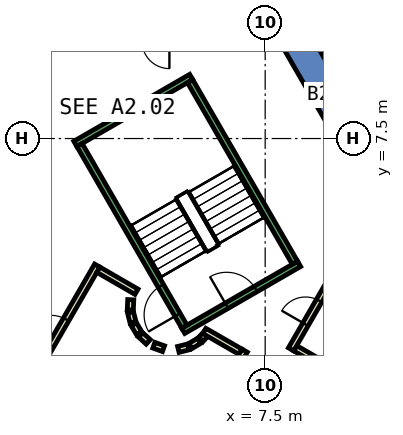
"""IFC4 building model, lengths in metres.
Left out: names, types, materials, properties, quantities, classifications, styles, units other than length and angle.
Written with IfcOpenShell. Run it as: python <this file> out.ifc"""

import sys

from ifc_helpers import new_model, si_unit, direction, frame, frame_2d, origin, place, context, subcontext, project, spatial, polyline, rectangle, outline, extrude, element, fill, save


model = new_model("IFC4")
c1 = context("Model", 3, precision=1e-05, world=origin(), true_north=direction((0.0, 1.0)))
c2 = subcontext(c1, "Body", "Model", "MODEL_VIEW")
j1 = project(units=[si_unit("LENGTHUNIT", "METRE"), si_unit("PLANEANGLEUNIT", "RADIAN")], contexts=[c1])
p1 = place(None, origin())
s1 = spatial("IfcSite", under=j1, at=p1, CompositionType="ELEMENT")
p2 = place(p1, origin())
s2 = spatial("IfcBuilding", under=s1, at=p2, CompositionType="ELEMENT")
p3 = place(p2, frame((0.0, 0.0, -11.0)))
s3 = spatial("IfcBuildingStorey", under=s2, at=p3, CompositionType="ELEMENT", Elevation=-11.0)
p4 = place(p3, frame((0.0, 0.0, -0.42)))
e1 = element("IfcWall", 1, at=p4, inside=s3, PredefinedType="SHEAR", context=c2, shape_type="SweptSolid", body=[
    extrude(outline(polyline([(8.517, 11.748), (7.651, 11.248), (12.702, 2.5), (13.856, 2.5), (8.517, 11.748)])), origin(), (0.0, 0.0, 1.0), 5.5),
])
p5 = place(p3, frame((0.0, 0.0, -0.42)))
e2 = element("IfcWall", 2, at=p5, inside=s3, PredefinedType="SHEAR", context=c2, shape_type="SweptSolid", body=[
    extrude(outline(polyline([(6.928, -9.5), (13.856, 2.5), (12.702, 2.5), (6.351, -8.5), (6.928, -9.5)])), origin(), (0.0, 0.0, 1.0), 5.5),
])
p6 = place(p3, frame((10.653, -0.648, 0.0), z_axis=(0.0, 0.0, 1.0), x_axis=(-0.866022959057, 0.500004234368, 0.0)))
e3 = element("IfcWall", 3, at=p6, inside=s3, PredefinedType="PARTITIONING", context=c2, shape_type="SweptSolid", body=[
    extrude(rectangle(XDim=2.5, YDim=0.2, at=frame_2d((1.25, 0.0))), origin(), (0.0, 0.0, 1.0), 5.05),
])
p7 = place(p3, frame((8.351, 0.565, 0.0), z_axis=(0.0, 0.0, 1.0), x_axis=(0.49989585183, 0.866085525409, 0.0)))
e4 = element("IfcWall", 4, at=p7, inside=s3, PredefinedType="PARTITIONING", context=c2, shape_type="SweptSolid", body=[
    extrude(rectangle(XDim=2.6, YDim=0.2, at=frame_2d((1.3, 0.0))), origin(), (0.0, 0.0, 1.0), 5.05),
])
p8 = place(p7, frame((0.95, 0.0, 0.0)))
e5 = element("IfcOpeningElement", 5, at=p8, cuts=e4, PredefinedType="OPENING", context=c2, shape_type="SweptSolid", body=[
    extrude(rectangle(XDim=0.9, YDim=2.1, at=frame_2d((0.45, 1.05))), frame((0.0, 0.11, 0.0), z_axis=(0.0, -1.0, 0.0), x_axis=(1.0, 0.0, 0.0)), (0.0, 0.0, 1.0), 0.22),
])
p9 = place(p3, frame((3.079, 2.199, 0.0), z_axis=(0.0, 0.0, 1.0), x_axis=(-0.047771483479, -0.998858290933, 0.0)))
e6 = element("IfcWall", 6, at=p9, inside=s3, PredefinedType="PARTITIONING", context=c2, shape_type="SweptSolid", body=[
    extrude(rectangle(XDim=0.337, YDim=0.2, at=frame_2d((0.169, 0.0))), origin(), (0.0, 0.0, 1.0), 5.05),
])
p10 = place(p3, frame((3.07, 1.786, 0.0), z_axis=(0.0, 0.0, 1.0), x_axis=(0.242705583207, -0.970099994784, 0.0)))
e7 = element("IfcWall", 7, at=p10, inside=s3, PredefinedType="PARTITIONING", context=c2, shape_type="SweptSolid", body=[
    extrude(rectangle(XDim=0.338, YDim=0.2, at=frame_2d((0.169, 0.0))), origin(), (0.0, 0.0, 1.0), 5.05),
])
for number, where, z_axis, x_axis in (
    (8, (3.182, 1.388, 0.0), (0.0, 0.0, 1.0), (0.512, -0.859, 0.0)),
    (9, (3.404, 1.039, 0.0), (0.0, 0.0, 1.0), (0.74, -0.672, 0.0)),
):
    element("IfcWall", number, at=place(p3, frame(where, z_axis=z_axis, x_axis=x_axis)), inside=s3, PredefinedType="PARTITIONING", context=c2, shape_type="SweptSolid", body=[
        extrude(rectangle(XDim=0.338, YDim=0.2, at=frame_2d((0.169, 0.0))), origin(), (0.0, 0.0, 1.0), 5.05),
    ])
p11 = place(p3, frame((3.838, 0.702, 0.0), z_axis=(0.0, 0.0, 1.0), x_axis=(0.941035081519, -0.338308993895, 0.0)))
e10 = element("IfcWall", 10, at=p11, inside=s3, PredefinedType="PARTITIONING", context=c2, shape_type="SweptSolid", body=[
    extrude(rectangle(XDim=0.337, YDim=0.2, at=frame_2d((0.168, 0.0))), origin(), (0.0, 0.0, 1.0), 5.05),
])
p12 = place(p3, frame((4.644, 0.564, 0.0), z_axis=(0.0, 0.0, 1.0), x_axis=(0.969929076366, 0.243387729394, 0.0)))
e11 = element("IfcWall", 11, at=p12, inside=s3, PredefinedType="PARTITIONING", context=c2, shape_type="SweptSolid", body=[
    extrude(rectangle(XDim=0.337, YDim=0.2, at=frame_2d((0.168, 0.0))), origin(), (0.0, 0.0, 1.0), 5.05),
])
p13 = place(p3, frame((5.042, 0.676, 0.0), z_axis=(0.0, 0.0, 1.0), x_axis=(0.857940155512, 0.513749637042, 0.0)))
e12 = element("IfcWall", 12, at=p13, inside=s3, PredefinedType="PARTITIONING", context=c2, shape_type="SweptSolid", body=[
    extrude(rectangle(XDim=0.337, YDim=0.2, at=frame_2d((0.168, 0.0))), origin(), (0.0, 0.0, 1.0), 5.05),
])
p14 = place(p3, frame((5.39, 0.898, 0.0), z_axis=(0.0, 0.0, 1.0), x_axis=(0.673828488714, 0.738887791073, 0.0)))
e13 = element("IfcWall", 13, at=p14, inside=s3, PredefinedType="PARTITIONING", context=c2, shape_type="SweptSolid", body=[
    extrude(rectangle(XDim=0.263, YDim=0.2, at=frame_2d((0.131, 0.0))), origin(), (0.0, 0.0, 1.0), 5.05),
])
p15 = place(p3, frame((5.499, 1.172, 0.0), z_axis=(0.0, 0.0, 1.0), x_axis=(0.866333505267, -0.499465972466, 0.0)))
e14 = element("IfcWall", 14, at=p15, inside=s3, PredefinedType="PARTITIONING", context=c2, shape_type="SweptSolid", body=[
    extrude(rectangle(XDim=1.374, YDim=0.2, at=frame_2d((0.687, 0.0))), origin(), (0.0, 0.0, 1.0), 5.05),
])
p16 = place(p3, frame((6.826, 0.522, 0.0), z_axis=(0.0, 0.0, 1.0), x_axis=(-0.500016722714, -0.866015748706, 0.0)))
e15 = element("IfcWall", 15, at=p16, inside=s3, PredefinedType="PARTITIONING", context=c2, shape_type="SweptSolid", body=[
    extrude(rectangle(XDim=1.7, YDim=0.2, at=frame_2d((0.85, 0.0))), origin(), (0.0, 0.0, 1.0), 5.05),
])
p17 = place(p3, frame((-0.52, -1.0, 0.0), z_axis=(0.0, 0.0, 1.0), x_axis=(0.50011622646, 0.865958290007, 0.0)))
e16 = element("IfcWall", 16, at=p17, inside=s3, PredefinedType="PARTITIONING", context=c2, shape_type="SweptSolid", body=[
    extrude(rectangle(XDim=4.991, YDim=0.2, at=frame_2d((2.496, 0.0))), origin(), (0.0, 0.0, 1.0), 5.05),
])
p18 = place(p17, frame((1.945, 0.0, 0.0)))
e17 = element("IfcOpeningElement", 17, at=p18, cuts=e16, PredefinedType="OPENING", context=c2, shape_type="SweptSolid", body=[
    extrude(rectangle(XDim=1.0, YDim=2.1, at=frame_2d((0.5, 1.05))), frame((0.0, 0.11, 0.0), z_axis=(0.0, -1.0, 0.0), x_axis=(1.0, 0.0, 0.0)), (0.0, 0.0, 1.0), 0.22),
])
p19 = place(p3, frame((2.012, 3.186, 0.0), z_axis=(0.0, 0.0, 1.0), x_axis=(0.865891012941, -0.500232699559, 0.0)))
e18 = element("IfcWall", 18, at=p19, inside=s3, PredefinedType="PARTITIONING", context=c2, shape_type="SweptSolid", body=[
    extrude(rectangle(XDim=1.449, YDim=0.2, at=frame_2d((0.725, 0.0))), origin(), (0.0, 0.0, 1.0), 5.05),
])
p20 = place(p3, frame((4.806, 1.176, 0.0), z_axis=(0.0, 0.0, 1.0), x_axis=(0.866059941101, 0.499940174841, 0.0)))
e19 = element("IfcWall", 19, at=p20, inside=s3, PredefinedType="STANDARD", context=c2, shape_type="SweptSolid", body=[
    extrude(rectangle(XDim=4.4, YDim=0.2, at=frame_2d((2.2, 0.0))), origin(), (0.0, 0.0, 1.0), 5.05),
])
p21 = place(p20, frame((1.65, 0.0, 0.0)))
e20 = element("IfcOpeningElement", 20, at=p21, cuts=e19, PredefinedType="OPENING", context=c2, shape_type="SweptSolid", body=[
    extrude(rectangle(XDim=1.1, YDim=2.2, at=frame_2d((0.55, 1.1))), frame((0.0, 0.11, 0.0), z_axis=(0.0, -1.0, 0.0), x_axis=(1.0, 0.0, 0.0)), (0.0, 0.0, 1.0), 0.22),
])
p22 = place(p3, frame((1.256, 7.324, 0.0), z_axis=(0.0, 0.0, 1.0), x_axis=(0.866046073146, 0.499964197906, 0.0)))
e21 = element("IfcWall", 21, at=p22, inside=s3, PredefinedType="STANDARD", context=c2, shape_type="SweptSolid", body=[
    extrude(rectangle(XDim=4.4, YDim=0.2, at=frame_2d((2.2, 0.0))), origin(), (0.0, 0.0, 1.0), 5.05),
])
p23 = place(p3, frame((4.843, 1.312, 0.0), z_axis=(0.0, 0.0, 1.0), x_axis=(-0.499963383562, 0.866046543262, 0.0)))
e22 = element("IfcWall", 22, at=p23, inside=s3, PredefinedType="STANDARD", context=c2, shape_type="SweptSolid", body=[
    extrude(rectangle(XDim=6.9, YDim=0.2, at=frame_2d((3.45, 0.0))), origin(), (0.0, 0.0, 1.0), 5.05),
])
p24 = place(p23, frame((0.45, 0.0, 0.0)))
e23 = element("IfcOpeningElement", 23, at=p24, cuts=e22, PredefinedType="OPENING", context=c2, shape_type="SweptSolid", body=[
    extrude(rectangle(XDim=1.1, YDim=2.2, at=frame_2d((0.55, 1.1))), frame((0.0, 0.11, 0.0), z_axis=(0.0, -1.0, 0.0), x_axis=(1.0, 0.0, 0.0)), (0.0, 0.0, 1.0), 0.22),
])
p25 = place(p3, frame((8.48, 3.412, 0.0), z_axis=(0.0, 0.0, 1.0), x_axis=(-0.499978703459, 0.866037698999, 0.0)))
e24 = element("IfcWall", 24, at=p25, inside=s3, PredefinedType="STANDARD", context=c2, shape_type="SweptSolid", body=[
    extrude(rectangle(XDim=6.9, YDim=0.2, at=frame_2d((3.45, 0.0))), origin(), (0.0, 0.0, 1.0), 5.05),
])
p26 = place(p18, origin())
e25 = element("IfcDoor", 25, at=p26, inside=s3, OperationType="SINGLE_SWING_LEFT", PredefinedType="DOOR", context=c2, shape_type="SweptSolid", body=[
    extrude(rectangle(XDim=1.0, YDim=2.1, at=frame_2d((0.5, 1.05))), frame((0.0, 0.025, 0.0), z_axis=(0.0, -1.0, 0.0), x_axis=(1.0, 0.0, 0.0)), (0.0, 0.0, 1.0), 0.05),
])
fill(e17, e25)
p27 = place(p8, origin())
e26 = element("IfcDoor", 26, at=p27, inside=s3, OperationType="SINGLE_SWING_LEFT", PredefinedType="DOOR", context=c2, shape_type="SweptSolid", body=[
    extrude(rectangle(XDim=0.9, YDim=2.1, at=frame_2d((0.45, 1.05))), frame((0.0, 0.025, 0.0), z_axis=(0.0, -1.0, 0.0), x_axis=(1.0, 0.0, 0.0)), (0.0, 0.0, 1.0), 0.05),
])
fill(e5, e26)
p28 = place(p24, origin())
e27 = element("IfcDoor", 27, at=p28, inside=s3, OperationType="SINGLE_SWING_LEFT", PredefinedType="DOOR", context=c2, shape_type="SweptSolid", body=[
    extrude(rectangle(XDim=1.1, YDim=2.2, at=frame_2d((0.55, 1.1))), frame((0.0, 0.025, 0.0), z_axis=(0.0, -1.0, 0.0), x_axis=(1.0, 0.0, 0.0)), (0.0, 0.0, 1.0), 0.05),
])
fill(e23, e27)
p29 = place(p21, origin())
e28 = element("IfcDoor", 28, at=p29, inside=s3, OperationType="SINGLE_SWING_LEFT", PredefinedType="DOOR", context=c2, shape_type="SweptSolid", body=[
    extrude(rectangle(XDim=1.1, YDim=2.2, at=frame_2d((0.55, 1.1))), frame((0.0, 0.025, 0.0), z_axis=(0.0, -1.0, 0.0), x_axis=(1.0, 0.0, 0.0)), (0.0, 0.0, 1.0), 0.05),
])
fill(e20, e28)
save(model, sys.argv[1])
